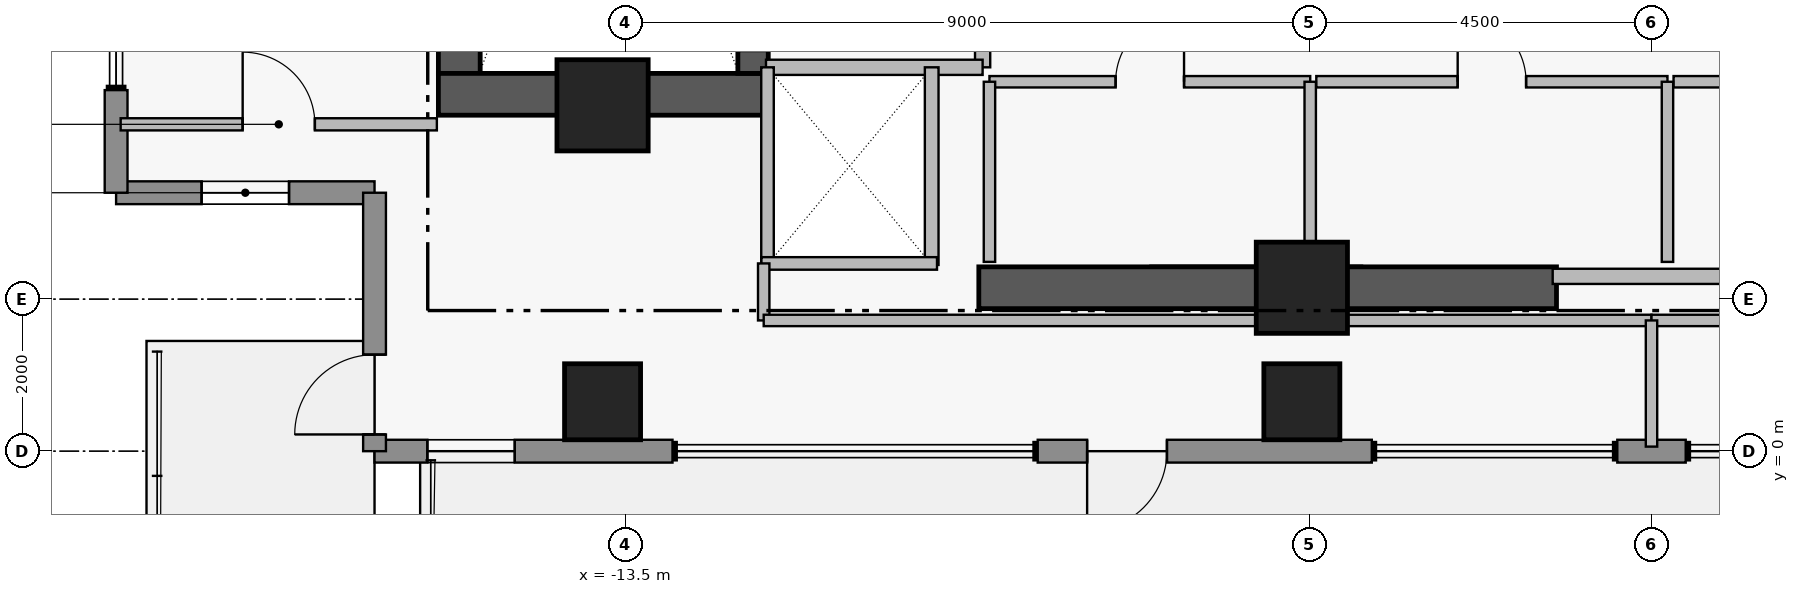
"""IFC4 building model, lengths in metres.
Left out: names, types, materials, properties, quantities, classifications, styles, units other than length and angle.
Written with IfcOpenShell. Run it as: python <this file> out.ifc"""

import sys

from ifc_helpers import new_model, si_unit, direction, frame, frame_2d, origin, origin_2d, place, context, subcontext, project, spatial, rectangle, extrude, element, fill, save


model = new_model("IFC4")
c1 = context("Model", 3, precision=1e-05, world=origin(), true_north=direction((0.0, 1.0)))
c2 = subcontext(c1, "Body", "Model", "MODEL_VIEW")
j1 = project(units=[si_unit("LENGTHUNIT", "METRE"), si_unit("PLANEANGLEUNIT", "RADIAN")], contexts=[c1])
p1 = place(None, origin())
s1 = spatial("IfcSite", under=j1, at=p1, CompositionType="ELEMENT")
p2 = place(p1, origin())
s2 = spatial("IfcBuilding", under=s1, at=p2, CompositionType="ELEMENT")
p3 = place(p2, frame((0.0, 0.0, 239.65)))
s3 = spatial("IfcBuildingStorey", under=s2, at=p3, CompositionType="ELEMENT", Elevation=239.65)
p4 = place(p3, frame((-15.685, 4.97, 0.0), z_axis=(0.0, 0.0, 1.0), x_axis=(0.0, 1.0, 0.0)))
e1 = element("IfcWall", 1, at=p4, inside=s3, PredefinedType="SHEAR", context=c2, shape_type="SweptSolid", body=[
    extrude(rectangle(XDim=8.96, YDim=0.55, at=frame_2d((4.48, 0.0))), origin(), (0.0, 0.0, 1.0), 3.51),
])
p5 = place(p3, frame((-15.96, 4.695, 0.0), z_axis=(0.0, 0.0, 1.0), x_axis=(1.0, 0.0, 0.0)))
e2 = element("IfcWall", 2, at=p5, inside=s3, PredefinedType="SHEAR", context=c2, shape_type="SweptSolid", body=[
    extrude(rectangle(XDim=4.36, YDim=0.55, at=frame_2d((2.18, 0.0))), origin(), (0.0, 0.0, 1.0), 3.51),
])
p6 = place(p3, frame((-8.85, 2.15, 0.0), z_axis=(0.0, 0.0, 1.0), x_axis=(1.0, 0.0, 0.0)))
e3 = element("IfcWall", 3, at=p6, inside=s3, PredefinedType="SHEAR", context=c2, shape_type="SweptSolid", body=[
    extrude(rectangle(XDim=7.6, YDim=0.55, at=frame_2d((3.8, 0.0))), origin(), (0.0, 0.0, 1.0), 3.48),
])
p7 = place(p3, frame((-11.82, 4.97, 0.0), z_axis=(0.0, 0.0, 1.0), x_axis=(0.0, 1.0, 0.0)))
e4 = element("IfcWall", 4, at=p7, inside=s3, PredefinedType="SHEAR", context=c2, shape_type="SweptSolid", body=[
    extrude(rectangle(XDim=8.96, YDim=0.4, at=frame_2d((4.48, 0.0))), origin(), (0.0, 0.0, 1.0), 3.51),
])
p8 = place(p7, frame((0.31, 0.0, 0.0)))
e5 = element("IfcOpeningElement", 5, at=p8, cuts=e4, PredefinedType="OPENING", context=c2, shape_type="SweptSolid", body=[
    extrude(rectangle(XDim=1.12, YDim=2.22, at=frame_2d((0.56, 1.11))), frame((0.0, 0.21, 0.0), z_axis=(0.0, -1.0, 0.0), x_axis=(1.0, 0.0, 0.0)), (0.0, 0.0, 1.0), 0.42),
])
for number, where, z_axis, x_axis in (
    (6, (-13.8, 4.55, 0.0), (0.0, 0.0, 1.0), (1.0, 0.0, 0.0)),
    (7, (-4.6, 2.15, 0.0), (0.0, 0.0, 1.0), (1.0, 0.0, 0.0)),
):
    element("IfcColumn", number, at=place(p3, frame(where, z_axis=z_axis, x_axis=x_axis)), inside=s3, PredefinedType="COLUMN", context=c2, shape_type="SweptSolid", body=[
        extrude(rectangle(XDim=1.2, YDim=1.2, at=origin_2d()), origin(), (0.0, 0.0, 1.0), 3.7),
    ])
for number, where, z_axis, x_axis in (
    (8, (-13.8, 0.65, 0.43), (0.0, 0.0, 1.0), (1.0, 0.0, 0.0)),
    (9, (-4.6, 0.65, 0.43), (0.0, 0.0, 1.0), (1.0, 0.0, 0.0)),
):
    element("IfcColumn", number, at=place(p3, frame(where, z_axis=z_axis, x_axis=x_axis)), inside=s3, PredefinedType="COLUMN", context=c2, shape_type="SweptSolid", body=[
        extrude(rectangle(XDim=1.0, YDim=1.0, at=origin_2d()), origin(), (0.0, 0.0, 1.0), 3.27),
    ])
p9 = place(p3, frame((-16.8, 3.4, 0.0), z_axis=(0.0, 0.0, 1.0), x_axis=(-1.0, 0.0, 0.0)))
e10 = element("IfcWall", 10, at=p9, inside=s3, PredefinedType="STANDARD", context=c2, shape_type="SweptSolid", body=[
    extrude(rectangle(XDim=3.4, YDim=0.3, at=frame_2d((1.7, 0.0))), origin(), (0.0, 0.0, 1.0), 3.48),
])
p10 = place(p9, frame((1.125, 0.0, 1.25)))
e11 = element("IfcOpeningElement", 11, at=p10, cuts=e10, PredefinedType="OPENING", context=c2, shape_type="SweptSolid", body=[
    extrude(rectangle(XDim=1.15, YDim=1.55, at=frame_2d((0.575, 0.775))), frame((0.0, 0.16, 0.0), z_axis=(0.0, -1.0, 0.0), x_axis=(1.0, 0.0, 0.0)), (0.0, 0.0, 1.0), 0.32),
])
p11 = place(p3, frame((-20.2, 3.4, 0.0), z_axis=(0.0, 0.0, 1.0), x_axis=(0.0, 1.0, 0.0)))
e12 = element("IfcWall", 12, at=p11, inside=s3, PredefinedType="STANDARD", context=c2, shape_type="SweptSolid", body=[
    extrude(rectangle(XDim=1.35, YDim=0.3, at=frame_2d((0.675, 0.0))), origin(), (0.0, 0.0, 1.0), 3.48),
])
p12 = place(p3, frame((0.45, 0.0, 0.0), z_axis=(0.0, 0.0, 1.0), x_axis=(-1.0, 0.0, 0.0)))
e13 = element("IfcWall", 13, at=p12, inside=s3, PredefinedType="STANDARD", context=c2, shape_type="SweptSolid", body=[
    extrude(rectangle(XDim=0.9, YDim=0.3, at=frame_2d((0.45, 0.0))), origin(), (0.0, 0.0, 1.0), 3.48),
])
p13 = place(p3, frame((-3.68, 0.0, 0.0), z_axis=(0.0, 0.0, 1.0), x_axis=(-1.0, 0.0, 0.0)))
e14 = element("IfcWall", 14, at=p13, inside=s3, PredefinedType="STANDARD", context=c2, shape_type="SweptSolid", body=[
    extrude(rectangle(XDim=4.395, YDim=0.3, at=frame_2d((2.198, 0.0))), origin(), (0.0, 0.0, 1.0), 3.48),
])
p14 = place(p13, frame((2.695, 0.0, 0.0)))
e15 = element("IfcOpeningElement", 15, at=p14, cuts=e14, PredefinedType="OPENING", context=c2, shape_type="SweptSolid", body=[
    extrude(rectangle(XDim=1.05, YDim=2.2, at=frame_2d((0.525, 1.1))), frame((0.0, 0.16, 0.0), z_axis=(0.0, -1.0, 0.0), x_axis=(1.0, 0.0, 0.0)), (0.0, 0.0, 1.0), 0.32),
])
p15 = place(p3, frame((-12.88, 0.0, 0.0), z_axis=(0.0, 0.0, 1.0), x_axis=(-1.0, 0.0, 0.0)))
e16 = element("IfcWall", 16, at=p15, inside=s3, PredefinedType="STANDARD", context=c2, shape_type="SweptSolid", body=[
    extrude(rectangle(XDim=3.92, YDim=0.3, at=frame_2d((1.96, 0.0))), origin(), (0.0, 0.0, 1.0), 3.48),
])
p16 = place(p15, frame((2.075, 0.0, 0.95)))
e17 = element("IfcOpeningElement", 17, at=p16, cuts=e16, PredefinedType="OPENING", context=c2, shape_type="SweptSolid", body=[
    extrude(rectangle(XDim=1.15, YDim=1.55, at=frame_2d((0.575, 0.775))), frame((0.0, 0.16, 0.0), z_axis=(0.0, -1.0, 0.0), x_axis=(1.0, 0.0, 0.0)), (0.0, 0.0, 1.0), 0.32),
])
p17 = place(p3, frame((-16.8, 0.0, 0.0), z_axis=(0.0, 0.0, 1.0), x_axis=(0.0, 1.0, 0.0)))
e18 = element("IfcWall", 18, at=p17, inside=s3, PredefinedType="STANDARD", context=c2, shape_type="SweptSolid", body=[
    extrude(rectangle(XDim=3.4, YDim=0.3, at=frame_2d((1.7, 0.0))), origin(), (0.0, 0.0, 1.0), 3.48),
])
p18 = place(p17, frame((0.22, 0.0, 0.0)))
e19 = element("IfcOpeningElement", 19, at=p18, cuts=e18, PredefinedType="OPENING", context=c2, shape_type="SweptSolid", body=[
    extrude(rectangle(XDim=1.05, YDim=2.2, at=frame_2d((0.525, 1.1))), frame((0.0, 0.16, 0.0), z_axis=(0.0, -1.0, 0.0), x_axis=(1.0, 0.0, 0.0)), (0.0, 0.0, 1.0), 0.32),
])
p19 = place(p3, frame((-8.8, 5.05, 0.0), z_axis=(0.0, 0.0, 1.0), x_axis=(0.0, 1.0, 0.0)))
e20 = element("IfcWall", 20, at=p19, inside=s3, PredefinedType="PARTITIONING", context=c2, shape_type="SweptSolid", body=[
    extrude(rectangle(XDim=6.1, YDim=0.2, at=frame_2d((3.05, 0.0))), origin(), (0.0, 0.0, 1.0), 3.48),
])
p20 = place(p19, frame((0.25, 0.0, 0.0)))
e21 = element("IfcOpeningElement", 21, at=p20, cuts=e20, PredefinedType="OPENING", context=c2, shape_type="SweptSolid", body=[
    extrude(rectangle(XDim=1.1, YDim=2.2, at=frame_2d((0.55, 1.1))), frame((0.0, 0.11, 0.0), z_axis=(0.0, -1.0, 0.0), x_axis=(1.0, 0.0, 0.0)), (0.0, 0.0, 1.0), 0.22),
])
p21 = place(p19, frame((3.85, 0.0, 0.0)))
e22 = element("IfcOpeningElement", 22, at=p21, cuts=e20, PredefinedType="OPENING", context=c2, shape_type="SweptSolid", body=[
    extrude(rectangle(XDim=1.1, YDim=2.2, at=frame_2d((0.55, 1.1))), frame((0.0, 0.11, 0.0), z_axis=(0.0, -1.0, 0.0), x_axis=(1.0, 0.0, 0.0)), (0.0, 0.0, 1.0), 0.22),
])
p22 = place(p3, frame((-8.71, 4.86, 0.0), z_axis=(0.0, 0.0, 1.0), x_axis=(1.0, 0.0, 0.0)))
e23 = element("IfcWall", 23, at=p22, inside=s3, PredefinedType="PARTITIONING", context=c2, shape_type="SweptSolid", body=[
    extrude(rectangle(XDim=4.22, YDim=0.15, at=frame_2d((2.11, 0.0))), origin(), (0.0, 0.0, 1.0), 3.48),
])
p23 = place(p22, frame((1.66, 0.0, 0.0)))
e24 = element("IfcOpeningElement", 24, at=p23, cuts=e23, PredefinedType="OPENING", context=c2, shape_type="SweptSolid", body=[
    extrude(rectangle(XDim=0.9, YDim=2.15, at=frame_2d((0.45, 1.075))), frame((0.0, 0.085, 0.0), z_axis=(0.0, -1.0, 0.0), x_axis=(1.0, 0.0, 0.0)), (0.0, 0.0, 1.0), 0.17),
])
p24 = place(p3, frame((-4.41, 4.86, 0.0), z_axis=(0.0, 0.0, 1.0), x_axis=(1.0, 0.0, 0.0)))
e25 = element("IfcWall", 25, at=p24, inside=s3, PredefinedType="PARTITIONING", context=c2, shape_type="SweptSolid", body=[
    extrude(rectangle(XDim=4.62, YDim=0.15, at=frame_2d((2.31, 0.0))), origin(), (0.0, 0.0, 1.0), 3.48),
])
p25 = place(p24, frame((1.86, 0.0, 0.0)))
e26 = element("IfcOpeningElement", 26, at=p25, cuts=e25, PredefinedType="OPENING", context=c2, shape_type="SweptSolid", body=[
    extrude(rectangle(XDim=0.9, YDim=2.15, at=frame_2d((0.45, 1.075))), frame((0.0, 0.085, 0.0), z_axis=(0.0, -1.0, 0.0), x_axis=(1.0, 0.0, 0.0)), (0.0, 0.0, 1.0), 0.17),
])
p26 = place(p3, frame((0.29, 4.86, 0.0), z_axis=(0.0, 0.0, 1.0), x_axis=(1.0, 0.0, 0.0)))
e27 = element("IfcWall", 27, at=p26, inside=s3, PredefinedType="PARTITIONING", context=c2, shape_type="SweptSolid", body=[
    extrude(rectangle(XDim=3.42, YDim=0.15, at=frame_2d((1.71, 0.0))), origin(), (0.0, 0.0, 1.0), 3.48),
])
p27 = place(p26, frame((1.26, 0.0, 0.0)))
e28 = element("IfcOpeningElement", 28, at=p27, cuts=e27, PredefinedType="OPENING", context=c2, shape_type="SweptSolid", body=[
    extrude(rectangle(XDim=0.9, YDim=2.15, at=frame_2d((0.45, 1.075))), frame((0.0, 0.085, 0.0), z_axis=(0.0, -1.0, 0.0), x_axis=(1.0, 0.0, 0.0)), (0.0, 0.0, 1.0), 0.17),
])
p28 = place(p3, frame((-20.14, 4.3, 0.0), z_axis=(0.0, 0.0, 1.0), x_axis=(1.0, 0.0, 0.0)))
e29 = element("IfcWall", 29, at=p28, inside=s3, PredefinedType="PARTITIONING", context=c2, shape_type="SweptSolid", body=[
    extrude(rectangle(XDim=4.16, YDim=0.16, at=frame_2d((2.08, 0.0))), origin(), (0.0, 0.0, 1.0), 3.48),
])
p29 = place(p28, frame((1.605, 0.0, 0.0)))
e30 = element("IfcOpeningElement", 30, at=p29, cuts=e29, PredefinedType="OPENING", context=c2, shape_type="SweptSolid", body=[
    extrude(rectangle(XDim=0.95, YDim=2.15, at=frame_2d((0.475, 1.075))), frame((0.0, 0.09, 0.0), z_axis=(0.0, -1.0, 0.0), x_axis=(1.0, 0.0, 0.0)), (0.0, 0.0, 1.0), 0.18),
])
p30 = place(p3, frame((-11.65, 5.05, 0.0), z_axis=(0.0, 0.0, 1.0), x_axis=(1.0, 0.0, 0.0)))
e31 = element("IfcWall", 31, at=p30, inside=s3, PredefinedType="PARTITIONING", context=c2, shape_type="SweptSolid", body=[
    extrude(rectangle(XDim=2.85, YDim=0.2, at=frame_2d((1.425, 0.0))), origin(), (0.0, 0.0, 1.0), 3.48),
])
p31 = place(p3, frame((-1.3, 2.3, 0.0), z_axis=(0.0, 0.0, 1.0), x_axis=(1.0, 0.0, 0.0)))
e32 = element("IfcWall", 32, at=p31, inside=s3, PredefinedType="PARTITIONING", context=c2, shape_type="SweptSolid", body=[
    extrude(rectangle(XDim=2.6, YDim=0.2, at=frame_2d((1.3, 0.0))), origin(), (0.0, 0.0, 1.0), 2.38),
])
for number, where, z_axis, x_axis in (
    (33, (-8.71, 2.49, 0.0), (0.0, 0.0, 1.0), (0.0, 1.0, 0.0)),
    (34, (-4.49, 2.49, 0.0), (0.0, 0.0, 1.0), (0.0, 1.0, 0.0)),
    (35, (0.21, 2.49, 0.0), (0.0, 0.0, 1.0), (0.0, 1.0, 0.0)),
):
    element("IfcWall", number, at=place(p3, frame(where, z_axis=z_axis, x_axis=x_axis)), inside=s3, PredefinedType="PARTITIONING", context=c2, shape_type="SweptSolid", body=[
        extrude(rectangle(XDim=2.37, YDim=0.15, at=frame_2d((1.185, 0.0))), origin(), (0.0, 0.0, 1.0), 3.48),
    ])
p32 = place(p3, frame((-9.47, 2.45, 0.0), z_axis=(0.0, 0.0, 1.0), x_axis=(0.0, 1.0, 0.0)))
e36 = element("IfcWall", 36, at=p32, inside=s3, PredefinedType="PARTITIONING", context=c2, shape_type="SweptSolid", body=[
    extrude(rectangle(XDim=2.6, YDim=0.18, at=frame_2d((1.3, 0.0))), origin(), (0.0, 0.0, 1.0), 3.48),
])
p33 = place(p3, frame((-11.63, 2.47, 0.0), z_axis=(0.0, 0.0, 1.0), x_axis=(0.0, 1.0, 0.0)))
e37 = element("IfcWall", 37, at=p33, inside=s3, PredefinedType="PARTITIONING", context=c2, shape_type="SweptSolid", body=[
    extrude(rectangle(XDim=2.58, YDim=0.165, at=frame_2d((1.29, 0.0))), origin(), (0.0, 0.0, 1.0), 3.48),
])
p34 = place(p3, frame((-11.71, 2.47, 0.0), z_axis=(0.0, 0.0, 1.0), x_axis=(1.0, 0.0, 0.0)))
e38 = element("IfcWall", 38, at=p34, inside=s3, PredefinedType="PARTITIONING", context=c2, shape_type="SweptSolid", body=[
    extrude(rectangle(XDim=2.31, YDim=0.165, at=frame_2d((1.155, 0.0))), origin(), (0.0, 0.0, 1.0), 2.38),
])
p35 = place(p3, frame((-11.68, 1.72, 0.0), z_axis=(0.0, 0.0, 1.0), x_axis=(0.0, 1.0, 0.0)))
e39 = element("IfcWall", 39, at=p35, inside=s3, PredefinedType="PARTITIONING", context=c2, shape_type="SweptSolid", body=[
    extrude(rectangle(XDim=0.75, YDim=0.15, at=frame_2d((0.375, 0.0))), origin(), (0.0, 0.0, 1.0), 3.48),
])
for number, where, z_axis, x_axis in (
    (40, (-11.68, 1.72, 0.0), (0.0, 0.0, 1.0), (1.0, 0.0, 0.0)),
    (41, (0.0, 1.72, 0.0), (0.0, 0.0, 1.0), (1.0, 0.0, 0.0)),
):
    element("IfcWall", number, at=place(p3, frame(where, z_axis=z_axis, x_axis=x_axis)), inside=s3, PredefinedType="PARTITIONING", context=c2, shape_type="SweptSolid", body=[
        extrude(rectangle(XDim=11.68, YDim=0.15, at=frame_2d((5.84, 0.0))), origin(), (0.0, 0.0, 1.0), 2.38),
    ])
p36 = place(p3, frame((0.0, 0.06, 0.0), z_axis=(0.0, 0.0, 1.0), x_axis=(0.0, 1.0, 0.0)))
e42 = element("IfcWall", 42, at=p36, inside=s3, PredefinedType="PARTITIONING", context=c2, shape_type="SweptSolid", body=[
    extrude(rectangle(XDim=1.66, YDim=0.15, at=frame_2d((0.83, 0.0))), origin(), (0.0, 0.0, 1.0), 3.48),
])
p37 = place(p10, origin())
e43 = element("IfcWindow", 43, at=p37, inside=s3, PartitioningType="SINGLE_PANEL", PredefinedType="WINDOW", context=c2, shape_type="SweptSolid", body=[
    extrude(rectangle(XDim=1.15, YDim=1.55, at=frame_2d((0.575, 0.775))), frame((0.0, 0.03, 0.0), z_axis=(0.0, -1.0, 0.0), x_axis=(1.0, 0.0, 0.0)), (0.0, 0.0, 1.0), 0.06),
])
fill(e11, e43)
p38 = place(p14, origin())
e44 = element("IfcDoor", 44, at=p38, inside=s3, OperationType="SINGLE_SWING_RIGHT", PredefinedType="DOOR", context=c2, shape_type="SweptSolid", body=[
    extrude(rectangle(XDim=1.05, YDim=2.2, at=frame_2d((0.525, 1.1))), frame((0.0, 0.025, 0.0), z_axis=(0.0, -1.0, 0.0), x_axis=(1.0, 0.0, 0.0)), (0.0, 0.0, 1.0), 0.05),
])
fill(e15, e44)
p39 = place(p16, origin())
e45 = element("IfcWindow", 45, at=p39, inside=s3, PartitioningType="SINGLE_PANEL", PredefinedType="WINDOW", context=c2, shape_type="SweptSolid", body=[
    extrude(rectangle(XDim=1.15, YDim=1.55, at=frame_2d((0.575, 0.775))), frame((0.0, 0.03, 0.0), z_axis=(0.0, -1.0, 0.0), x_axis=(1.0, 0.0, 0.0)), (0.0, 0.0, 1.0), 0.06),
])
fill(e17, e45)
p40 = place(p18, origin())
e46 = element("IfcDoor", 46, at=p40, inside=s3, OperationType="SINGLE_SWING_LEFT", PredefinedType="DOOR", context=c2, shape_type="SweptSolid", body=[
    extrude(rectangle(XDim=1.05, YDim=2.2, at=frame_2d((0.525, 1.1))), frame((0.0, 0.025, 0.0), z_axis=(0.0, -1.0, 0.0), x_axis=(1.0, 0.0, 0.0)), (0.0, 0.0, 1.0), 0.05),
])
fill(e19, e46)
p41 = place(p23, origin())
e47 = element("IfcDoor", 47, at=p41, inside=s3, OperationType="SINGLE_SWING_RIGHT", PredefinedType="DOOR", context=c2, shape_type="SweptSolid", body=[
    extrude(rectangle(XDim=0.9, YDim=2.15, at=frame_2d((0.45, 1.075))), frame((0.0, 0.025, 0.0), z_axis=(0.0, -1.0, 0.0), x_axis=(1.0, 0.0, 0.0)), (0.0, 0.0, 1.0), 0.05),
])
fill(e24, e47)
p42 = place(p25, origin())
e48 = element("IfcDoor", 48, at=p42, inside=s3, OperationType="SINGLE_SWING_LEFT", PredefinedType="DOOR", context=c2, shape_type="SweptSolid", body=[
    extrude(rectangle(XDim=0.9, YDim=2.15, at=frame_2d((0.45, 1.075))), frame((0.0, 0.025, 0.0), z_axis=(0.0, -1.0, 0.0), x_axis=(1.0, 0.0, 0.0)), (0.0, 0.0, 1.0), 0.05),
])
fill(e26, e48)
p43 = place(p29, origin())
e49 = element("IfcDoor", 49, at=p43, inside=s3, OperationType="SINGLE_SWING_LEFT", PredefinedType="DOOR", context=c2, shape_type="SweptSolid", body=[
    extrude(rectangle(XDim=0.95, YDim=2.15, at=frame_2d((0.475, 1.075))), frame((0.0, 0.025, 0.0), z_axis=(0.0, -1.0, 0.0), x_axis=(1.0, 0.0, 0.0)), (0.0, 0.0, 1.0), 0.05),
])
fill(e30, e49)
save(model, sys.argv[1])
